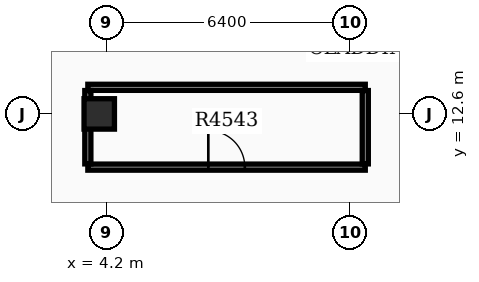
"""IFC4 building model, lengths in metres.
Left out: names, types, materials, properties, quantities, classifications, styles, units other than length and angle.
Written with IfcOpenShell. Run it as: python <this file> out.ifc"""

import sys

from ifc_helpers import new_model, si_unit, direction, frame, frame_2d, origin, origin_2d, place, context, subcontext, project, spatial, rectangle, extrude, element, fill, save


model = new_model("IFC4")
c1 = context("Model", 3, precision=1e-05, world=origin(), true_north=direction((0.0, 1.0)))
c2 = subcontext(c1, "Body", "Model", "MODEL_VIEW")
j1 = project(units=[si_unit("LENGTHUNIT", "METRE"), si_unit("PLANEANGLEUNIT", "RADIAN")], contexts=[c1])
p1 = place(None, origin())
s1 = spatial("IfcSite", under=j1, at=p1, CompositionType="ELEMENT")
p2 = place(p1, origin())
s2 = spatial("IfcBuilding", under=s1, at=p2, CompositionType="ELEMENT")
p3 = place(p2, frame((0.0, 0.0, 285.0)))
s3 = spatial("IfcBuildingStorey", under=s2, at=p3, CompositionType="ELEMENT", Elevation=285.0)
p4 = place(p3, frame((4.0, 12.6, 0.0), z_axis=(0.0, 0.0, 1.0), x_axis=(1.0, 0.0, 0.0)))
e1 = element("IfcColumn", 1, at=p4, inside=s3, PredefinedType="COLUMN", context=c2, shape_type="SweptSolid", body=[
    extrude(rectangle(XDim=0.8, YDim=0.8, at=origin_2d()), origin(), (0.0, 0.0, 1.0), 3.9),
])
p5 = place(p3, frame((3.7, 11.2, 0.0), z_axis=(0.0, 0.0, 1.0), x_axis=(1.0, 0.0, 0.0)))
e2 = element("IfcWall", 2, at=p5, inside=s3, PredefinedType="PARTITIONING", context=c2, shape_type="SweptSolid", body=[
    extrude(rectangle(XDim=7.3, YDim=0.16, at=frame_2d((3.65, 0.0))), origin(), (0.0, 0.0, 1.0), 3.12),
])
p6 = place(p5, frame((3.17, 0.0, 0.0)))
e3 = element("IfcOpeningElement", 3, at=p6, cuts=e2, PredefinedType="OPENING", context=c2, shape_type="SweptSolid", body=[
    extrude(rectangle(XDim=0.96, YDim=2.15, at=frame_2d((0.48, 1.075))), frame((0.0, 0.09, 0.0), z_axis=(0.0, -1.0, 0.0), x_axis=(1.0, 0.0, 0.0)), (0.0, 0.0, 1.0), 0.18),
])
p7 = place(p3, frame((3.7, 13.3, 0.0), z_axis=(0.0, 0.0, 1.0), x_axis=(1.0, 0.0, 0.0)))
e4 = element("IfcWall", 4, at=p7, inside=s3, PredefinedType="PARTITIONING", context=c2, shape_type="SweptSolid", body=[
    extrude(rectangle(XDim=7.3, YDim=0.16, at=frame_2d((3.65, 0.0))), origin(), (0.0, 0.0, 1.0), 3.12),
])
for number, where, z_axis, x_axis in (
    (5, (3.7, 11.285, 0.0), (0.0, 0.0, 1.0), (0.0, 1.0, 0.0)),
    (6, (11.0, 11.285, 0.0), (0.0, 0.0, 1.0), (0.0, 1.0, 0.0)),
):
    element("IfcWall", number, at=place(p3, frame(where, z_axis=z_axis, x_axis=x_axis)), inside=s3, PredefinedType="PARTITIONING", context=c2, shape_type="SweptSolid", body=[
        extrude(rectangle(XDim=1.93, YDim=0.16, at=frame_2d((0.965, 0.0))), origin(), (0.0, 0.0, 1.0), 3.12),
    ])
p8 = place(p6, origin())
e7 = element("IfcDoor", 7, at=p8, inside=s3, OperationType="SINGLE_SWING_LEFT", PredefinedType="DOOR", context=c2, shape_type="SweptSolid", body=[
    extrude(rectangle(XDim=0.96, YDim=2.15, at=frame_2d((0.48, 1.075))), frame((0.0, 0.025, 0.0), z_axis=(0.0, -1.0, 0.0), x_axis=(1.0, 0.0, 0.0)), (0.0, 0.0, 1.0), 0.05),
])
fill(e3, e7)
save(model, sys.argv[1])
